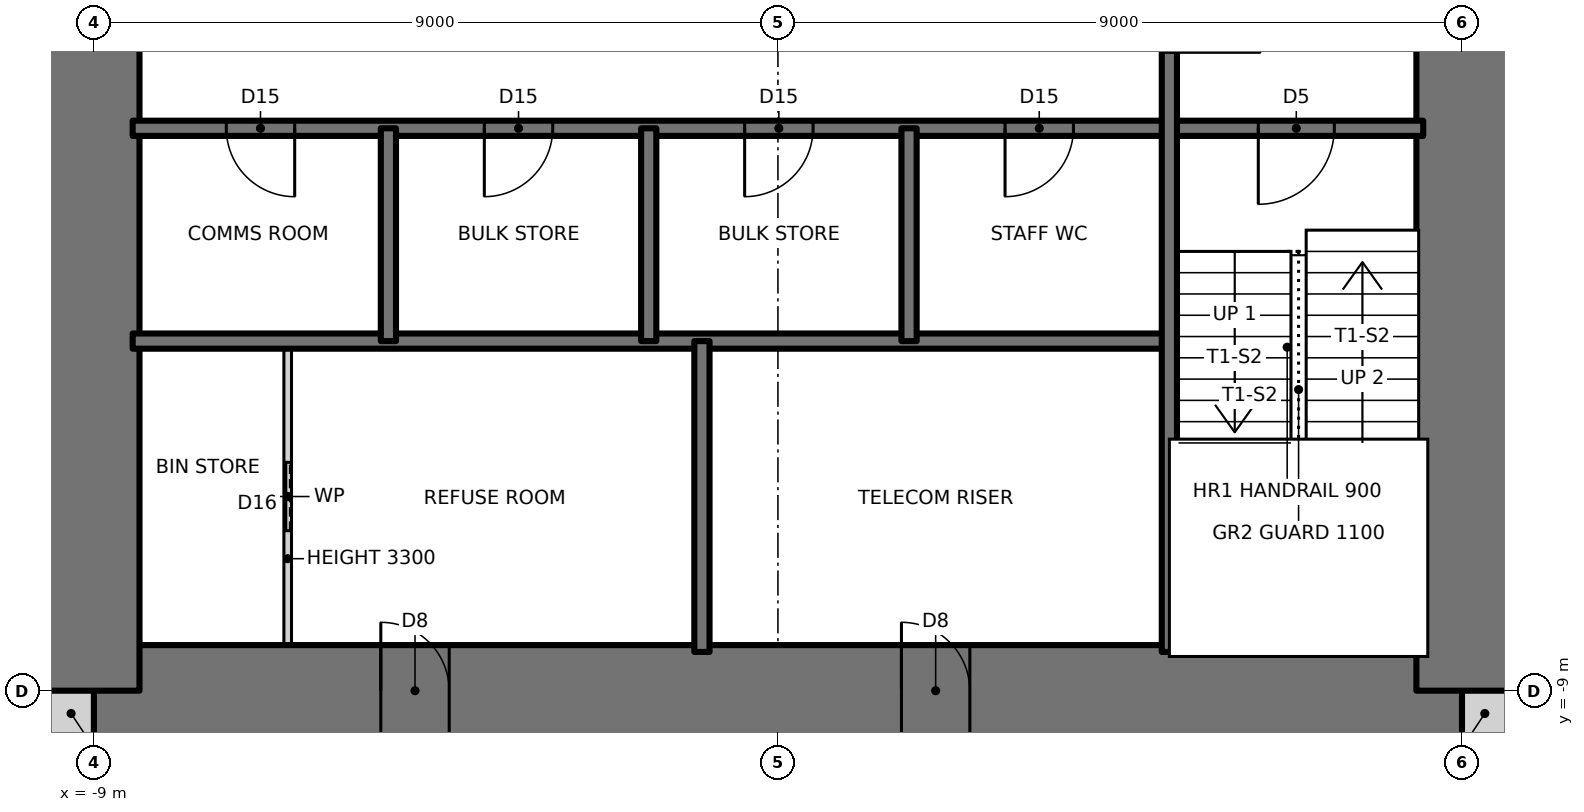
"""IFC4 building model, lengths in metres.
Left out: names, types, materials, properties, quantities, classifications, styles, units other than length and angle.
Written with IfcOpenShell. Run it as: python <this file> out.ifc"""

import sys

from ifc_helpers import new_model, si_unit, direction, frame, frame_2d, origin, place, context, subcontext, project, spatial, rectangle, extrude, element, fill, save


model = new_model("IFC4")
c1 = context("Model", 3, precision=1e-05, world=origin(), true_north=direction((0.0, 1.0)))
c2 = subcontext(c1, "Body", "Model", "MODEL_VIEW")
j1 = project(units=[si_unit("LENGTHUNIT", "METRE"), si_unit("PLANEANGLEUNIT", "RADIAN")], contexts=[c1])
p1 = place(None, origin())
s1 = spatial("IfcSite", under=j1, at=p1, CompositionType="ELEMENT")
p2 = place(p1, origin())
s2 = spatial("IfcBuilding", under=s1, at=p2, CompositionType="ELEMENT")
p3 = place(p2, frame((0.0, 0.0, 181.0)))
s3 = spatial("IfcBuildingStorey", under=s2, at=p3, CompositionType="ELEMENT", Elevation=181.0)
for number, where, z_axis, x_axis in (
    (1, (-9.6, -9.3, 0.0), (0.0, 0.0, 1.0), (1.0, 0.0, 0.0)),
    (2, (9.0, -9.3, 0.0), (0.0, 0.0, 1.0), (1.0, 0.0, 0.0)),
):
    element("IfcWall", number, at=place(p3, frame(where, z_axis=z_axis, x_axis=x_axis)), inside=s3, PredefinedType="SOLIDWALL", context=c2, shape_type="SweptSolid", body=[
        extrude(rectangle(XDim=0.6, YDim=0.6, at=frame_2d((0.3, 0.0))), origin(), (0.0, 0.0, 1.0), 3.5),
    ])
p4 = place(p3, frame((-9.0, -9.0, 0.0), z_axis=(0.0, 0.0, 1.0), x_axis=(1.0, 0.0, 0.0)))
e3 = element("IfcWall", 3, at=p4, inside=s3, PredefinedType="SHEAR", context=c2, shape_type="SweptSolid", body=[
    extrude(rectangle(XDim=18.0, YDim=1.2, at=frame_2d((9.0, 0.0))), origin(), (0.0, 0.0, 1.0), 3.5),
])
p5 = place(p4, frame((3.775, 0.0, 0.0)))
e4 = element("IfcOpeningElement", 4, at=p5, cuts=e3, PredefinedType="OPENING", context=c2, shape_type="SweptSolid", body=[
    extrude(rectangle(XDim=0.9, YDim=2.1, at=frame_2d((0.45, 1.05))), frame((0.0, 0.61, 0.0), z_axis=(0.0, -1.0, 0.0), x_axis=(1.0, 0.0, 0.0)), (0.0, 0.0, 1.0), 1.22),
])
p6 = place(p4, frame((10.625, 0.0, 0.0)))
e5 = element("IfcOpeningElement", 5, at=p6, cuts=e3, PredefinedType="OPENING", context=c2, shape_type="SweptSolid", body=[
    extrude(rectangle(XDim=0.9, YDim=2.1, at=frame_2d((0.45, 1.05))), frame((0.0, 0.61, 0.0), z_axis=(0.0, -1.0, 0.0), x_axis=(1.0, 0.0, 0.0)), (0.0, 0.0, 1.0), 1.22),
])
p7 = place(p3, frame((9.0, -9.0, 0.0), z_axis=(0.0, 0.0, 1.0), x_axis=(0.0, 1.0, 0.0)))
e6 = element("IfcWall", 6, at=p7, inside=s3, PredefinedType="SHEAR", context=c2, shape_type="SweptSolid", body=[
    extrude(rectangle(XDim=18.0, YDim=1.2, at=frame_2d((9.0, 0.0))), origin(), (0.0, 0.0, 1.0), 3.5),
])
p8 = place(p7, frame((8.5, 0.0, 0.0)))
e7 = element("IfcOpeningElement", 7, at=p8, cuts=e6, PredefinedType="OPENING", context=c2, shape_type="SweptSolid", body=[
    extrude(rectangle(XDim=1.0, YDim=2.1, at=frame_2d((0.5, 1.05))), frame((0.0, 0.61, 0.0), z_axis=(0.0, -1.0, 0.0), x_axis=(1.0, 0.0, 0.0)), (0.0, 0.0, 1.0), 1.22),
])
p9 = place(p3, frame((-9.0, 9.0, 0.0), z_axis=(0.0, 0.0, 1.0), x_axis=(0.0, -1.0, 0.0)))
e8 = element("IfcWall", 8, at=p9, inside=s3, PredefinedType="SHEAR", context=c2, shape_type="SweptSolid", body=[
    extrude(rectangle(XDim=18.0, YDim=1.2, at=frame_2d((9.0, 0.0))), origin(), (0.0, 0.0, 1.0), 3.5),
])
p10 = place(p9, frame((8.5, 0.0, 0.0)))
e9 = element("IfcOpeningElement", 9, at=p10, cuts=e8, PredefinedType="OPENING", context=c2, shape_type="SweptSolid", body=[
    extrude(rectangle(XDim=1.0, YDim=2.1, at=frame_2d((0.5, 1.05))), frame((0.0, 0.61, 0.0), z_axis=(0.0, -1.0, 0.0), x_axis=(1.0, 0.0, 0.0)), (0.0, 0.0, 1.0), 1.22),
])
p11 = place(p3, frame((-8.49, -4.4, 0.0), z_axis=(0.0, 0.0, 1.0), x_axis=(1.0, 0.0, 0.0)))
e10 = element("IfcWall", 10, at=p11, inside=s3, PredefinedType="SOLIDWALL", context=c2, shape_type="SweptSolid", body=[
    extrude(rectangle(XDim=13.64, YDim=0.2, at=frame_2d((6.82, 0.0))), origin(), (0.0, 0.0, 1.0), 3.5),
])
p12 = place(p3, frame((-8.49, -1.6, 0.0), z_axis=(0.0, 0.0, 1.0), x_axis=(1.0, 0.0, 0.0)))
e11 = element("IfcWall", 11, at=p12, inside=s3, PredefinedType="SOLIDWALL", context=c2, shape_type="SweptSolid", body=[
    extrude(rectangle(XDim=16.98, YDim=0.2, at=frame_2d((8.49, 0.0))), origin(), (0.0, 0.0, 1.0), 3.5),
])
p13 = place(p12, frame((14.81, 0.0, 0.0)))
e12 = element("IfcOpeningElement", 12, at=p13, cuts=e11, PredefinedType="OPENING", context=c2, shape_type="SweptSolid", body=[
    extrude(rectangle(XDim=1.0, YDim=2.1, at=frame_2d((0.5, 1.05))), frame((0.0, 0.11, 0.0), z_axis=(0.0, -1.0, 0.0), x_axis=(1.0, 0.0, 0.0)), (0.0, 0.0, 1.0), 0.22),
])
p14 = place(p12, frame((1.232, 0.0, 0.0)))
e13 = element("IfcOpeningElement", 13, at=p14, cuts=e11, PredefinedType="OPENING", context=c2, shape_type="SweptSolid", body=[
    extrude(rectangle(XDim=0.9, YDim=2.1, at=frame_2d((0.45, 1.05))), frame((0.0, 0.11, 0.0), z_axis=(0.0, -1.0, 0.0), x_axis=(1.0, 0.0, 0.0)), (0.0, 0.0, 1.0), 0.22),
])
p15 = place(p12, frame((4.627, 0.0, 0.0)))
e14 = element("IfcOpeningElement", 14, at=p15, cuts=e11, PredefinedType="OPENING", context=c2, shape_type="SweptSolid", body=[
    extrude(rectangle(XDim=0.9, YDim=2.1, at=frame_2d((0.45, 1.05))), frame((0.0, 0.11, 0.0), z_axis=(0.0, -1.0, 0.0), x_axis=(1.0, 0.0, 0.0)), (0.0, 0.0, 1.0), 0.22),
])
p16 = place(p12, frame((8.052, 0.0, 0.0)))
e15 = element("IfcOpeningElement", 15, at=p16, cuts=e11, PredefinedType="OPENING", context=c2, shape_type="SweptSolid", body=[
    extrude(rectangle(XDim=0.9, YDim=2.1, at=frame_2d((0.45, 1.05))), frame((0.0, 0.11, 0.0), z_axis=(0.0, -1.0, 0.0), x_axis=(1.0, 0.0, 0.0)), (0.0, 0.0, 1.0), 0.22),
])
p17 = place(p12, frame((11.478, 0.0, 0.0)))
e16 = element("IfcOpeningElement", 16, at=p17, cuts=e11, PredefinedType="OPENING", context=c2, shape_type="SweptSolid", body=[
    extrude(rectangle(XDim=0.9, YDim=2.1, at=frame_2d((0.45, 1.05))), frame((0.0, 0.11, 0.0), z_axis=(0.0, -1.0, 0.0), x_axis=(1.0, 0.0, 0.0)), (0.0, 0.0, 1.0), 0.22),
])
p18 = place(p3, frame((5.15, -8.49, 0.0), z_axis=(0.0, 0.0, 1.0), x_axis=(0.0, 1.0, 0.0)))
e17 = element("IfcWall", 17, at=p18, inside=s3, PredefinedType="SOLIDWALL", context=c2, shape_type="SweptSolid", body=[
    extrude(rectangle(XDim=13.09, YDim=0.2, at=frame_2d((6.545, 0.0))), origin(), (0.0, 0.0, 1.0), 3.5),
])
p19 = place(p18, frame((7.89, 0.0, 0.0)))
e18 = element("IfcOpeningElement", 18, at=p19, cuts=e17, PredefinedType="OPENING", context=c2, shape_type="SweptSolid", body=[
    extrude(rectangle(XDim=1.2, YDim=2.1, at=frame_2d((0.6, 1.05))), frame((0.0, 0.11, 0.0), z_axis=(0.0, -1.0, 0.0), x_axis=(1.0, 0.0, 0.0)), (0.0, 0.0, 1.0), 0.22),
])
p20 = place(p3, frame((1.725, -4.4, 0.0), z_axis=(0.0, 0.0, 1.0), x_axis=(0.0, 1.0, 0.0)))
e19 = element("IfcWall", 19, at=p20, inside=s3, PredefinedType="SOLIDWALL", context=c2, shape_type="SweptSolid", body=[
    extrude(rectangle(XDim=2.8, YDim=0.2, at=frame_2d((1.4, 0.0))), origin(), (0.0, 0.0, 1.0), 3.5),
])
p21 = place(p3, frame((-1.0, -8.49, 0.0), z_axis=(0.0, 0.0, 1.0), x_axis=(0.0, 1.0, 0.0)))
e20 = element("IfcWall", 20, at=p21, inside=s3, PredefinedType="SOLIDWALL", context=c2, shape_type="SweptSolid", body=[
    extrude(rectangle(XDim=4.09, YDim=0.2, at=frame_2d((2.045, 0.0))), origin(), (0.0, 0.0, 1.0), 3.5),
])
for number, where, z_axis, x_axis in (
    (21, (-1.7, -4.4, 0.0), (0.0, 0.0, 1.0), (0.0, 1.0, 0.0)),
    (22, (-5.125, -4.4, 0.0), (0.0, 0.0, 1.0), (0.0, 1.0, 0.0)),
):
    element("IfcWall", number, at=place(p3, frame(where, z_axis=z_axis, x_axis=x_axis)), inside=s3, PredefinedType="SOLIDWALL", context=c2, shape_type="SweptSolid", body=[
        extrude(rectangle(XDim=2.8, YDim=0.2, at=frame_2d((1.4, 0.0))), origin(), (0.0, 0.0, 1.0), 3.5),
    ])
p22 = place(p3, frame((-6.45, -8.49, 0.0), z_axis=(0.0, 0.0, 1.0), x_axis=(0.0, 1.0, 0.0)))
e23 = element("IfcWall", 23, at=p22, inside=s3, PredefinedType="PARTITIONING", context=c2, shape_type="SweptSolid", body=[
    extrude(rectangle(XDim=4.09, YDim=0.1, at=frame_2d((2.045, 0.0))), origin(), (0.0, 0.0, 1.0), 3.3),
])
p23 = place(p22, frame((1.595, 0.0, 0.0)))
e24 = element("IfcOpeningElement", 24, at=p23, cuts=e23, PredefinedType="OPENING", context=c2, shape_type="SweptSolid", body=[
    extrude(rectangle(XDim=0.9, YDim=2.1, at=frame_2d((0.45, 1.05))), frame((0.0, 0.06, 0.0), z_axis=(0.0, -1.0, 0.0), x_axis=(1.0, 0.0, 0.0)), (0.0, 0.0, 1.0), 0.12),
])
p24 = place(p13, frame((1.0, 0.0, 0.0), z_axis=(0.0, 0.0, 1.0), x_axis=(-1.0, 0.0, 0.0)))
e25 = element("IfcDoor", 25, at=p24, inside=s3, OperationType="SINGLE_SWING_RIGHT", PredefinedType="DOOR", context=c2, shape_type="SweptSolid", body=[
    extrude(rectangle(XDim=1.0, YDim=2.1, at=frame_2d((0.5, 1.05))), frame((0.0, 0.025, 0.0), z_axis=(0.0, -1.0, 0.0), x_axis=(1.0, 0.0, 0.0)), (0.0, 0.0, 1.0), 0.05),
])
fill(e12, e25)
p25 = place(p19, frame((1.2, 0.0, 0.0), z_axis=(0.0, 0.0, 1.0), x_axis=(-1.0, 0.0, 0.0)))
e26 = element("IfcDoor", 26, at=p25, inside=s3, OperationType="SINGLE_SWING_RIGHT", PredefinedType="DOOR", context=c2, shape_type="SweptSolid", body=[
    extrude(rectangle(XDim=1.2, YDim=2.1, at=frame_2d((0.6, 1.05))), frame((0.0, 0.025, 0.0), z_axis=(0.0, -1.0, 0.0), x_axis=(1.0, 0.0, 0.0)), (0.0, 0.0, 1.0), 0.05),
])
fill(e18, e26)
p26 = place(p14, frame((0.9, 0.0, 0.0), z_axis=(0.0, 0.0, 1.0), x_axis=(-1.0, 0.0, 0.0)))
e27 = element("IfcDoor", 27, at=p26, inside=s3, OperationType="SINGLE_SWING_LEFT", PredefinedType="DOOR", context=c2, shape_type="SweptSolid", body=[
    extrude(rectangle(XDim=0.9, YDim=2.1, at=frame_2d((0.45, 1.05))), frame((0.0, 0.025, 0.0), z_axis=(0.0, -1.0, 0.0), x_axis=(1.0, 0.0, 0.0)), (0.0, 0.0, 1.0), 0.05),
])
fill(e13, e27)
p27 = place(p15, frame((0.9, 0.0, 0.0), z_axis=(0.0, 0.0, 1.0), x_axis=(-1.0, 0.0, 0.0)))
e28 = element("IfcDoor", 28, at=p27, inside=s3, OperationType="SINGLE_SWING_RIGHT", PredefinedType="DOOR", context=c2, shape_type="SweptSolid", body=[
    extrude(rectangle(XDim=0.9, YDim=2.1, at=frame_2d((0.45, 1.05))), frame((0.0, 0.025, 0.0), z_axis=(0.0, -1.0, 0.0), x_axis=(1.0, 0.0, 0.0)), (0.0, 0.0, 1.0), 0.05),
])
fill(e14, e28)
p28 = place(p16, frame((0.9, 0.0, 0.0), z_axis=(0.0, 0.0, 1.0), x_axis=(-1.0, 0.0, 0.0)))
e29 = element("IfcDoor", 29, at=p28, inside=s3, OperationType="SINGLE_SWING_RIGHT", PredefinedType="DOOR", context=c2, shape_type="SweptSolid", body=[
    extrude(rectangle(XDim=0.9, YDim=2.1, at=frame_2d((0.45, 1.05))), frame((0.0, 0.025, 0.0), z_axis=(0.0, -1.0, 0.0), x_axis=(1.0, 0.0, 0.0)), (0.0, 0.0, 1.0), 0.05),
])
fill(e15, e29)
p29 = place(p17, frame((0.9, 0.0, 0.0), z_axis=(0.0, 0.0, 1.0), x_axis=(-1.0, 0.0, 0.0)))
e30 = element("IfcDoor", 30, at=p29, inside=s3, OperationType="SINGLE_SWING_RIGHT", PredefinedType="DOOR", context=c2, shape_type="SweptSolid", body=[
    extrude(rectangle(XDim=0.9, YDim=2.1, at=frame_2d((0.45, 1.05))), frame((0.0, 0.025, 0.0), z_axis=(0.0, -1.0, 0.0), x_axis=(1.0, 0.0, 0.0)), (0.0, 0.0, 1.0), 0.05),
])
fill(e16, e30)
p30 = place(p23, origin())
e31 = element("IfcDoor", 31, at=p30, inside=s3, OperationType="SLIDING_TO_LEFT", PredefinedType="DOOR", context=c2, shape_type="SweptSolid", body=[
    extrude(rectangle(XDim=0.9, YDim=2.1, at=frame_2d((0.45, 1.05))), frame((0.0, 0.025, 0.0), z_axis=(0.0, -1.0, 0.0), x_axis=(1.0, 0.0, 0.0)), (0.0, 0.0, 1.0), 0.05),
])
fill(e24, e31)
p31 = place(p5, origin())
e32 = element("IfcDoor", 32, at=p31, inside=s3, OperationType="SINGLE_SWING_LEFT", PredefinedType="DOOR", context=c2, shape_type="SweptSolid", body=[
    extrude(rectangle(XDim=0.9, YDim=2.1, at=frame_2d((0.45, 1.05))), frame((0.0, 0.025, 0.0), z_axis=(0.0, -1.0, 0.0), x_axis=(1.0, 0.0, 0.0)), (0.0, 0.0, 1.0), 0.05),
])
fill(e4, e32)
p32 = place(p6, origin())
e33 = element("IfcDoor", 33, at=p32, inside=s3, OperationType="SINGLE_SWING_LEFT", PredefinedType="DOOR", context=c2, shape_type="SweptSolid", body=[
    extrude(rectangle(XDim=0.9, YDim=2.1, at=frame_2d((0.45, 1.05))), frame((0.0, 0.025, 0.0), z_axis=(0.0, -1.0, 0.0), x_axis=(1.0, 0.0, 0.0)), (0.0, 0.0, 1.0), 0.05),
])
fill(e5, e33)
save(model, sys.argv[1])
